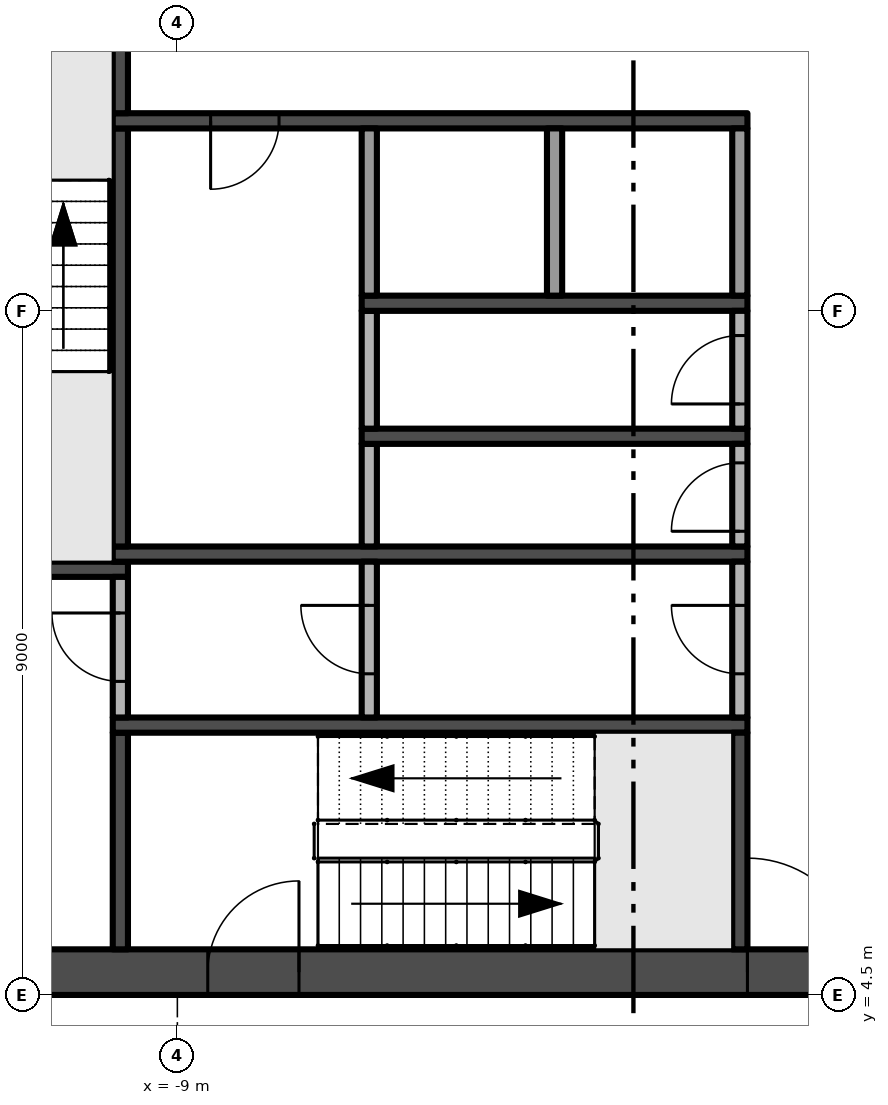
"""IFC4 building model, lengths in metres.
Left out: names, types, materials, properties, quantities, classifications, styles, units other than length and angle.
Written with IfcOpenShell. Run it as: python <this file> out.ifc"""

import sys

from ifc_helpers import new_model, si_unit, direction, frame, frame_2d, origin, place, context, subcontext, project, spatial, rectangle, extrude, element, fill, save


model = new_model("IFC4")
c1 = context("Model", 3, precision=1e-05, world=origin(), true_north=direction((0.0, 1.0)))
c2 = subcontext(c1, "Body", "Model", "MODEL_VIEW")
j1 = project(units=[si_unit("LENGTHUNIT", "METRE"), si_unit("PLANEANGLEUNIT", "RADIAN")], contexts=[c1])
p1 = place(None, origin())
s1 = spatial("IfcSite", under=j1, at=p1, CompositionType="ELEMENT")
p2 = place(p1, origin())
s2 = spatial("IfcBuilding", under=s1, at=p2, CompositionType="ELEMENT")
p3 = place(p2, frame((0.0, 0.0, 284.4)))
s3 = spatial("IfcBuildingStorey", under=s2, at=p3, CompositionType="ELEMENT", Elevation=284.4)
p4 = place(p3, frame((-13.5, 4.8, -0.3), z_axis=(0.0, 0.0, 1.0), x_axis=(1.0, 0.0, 0.0)))
e1 = element("IfcWall", 1, at=p4, inside=s3, PredefinedType="SHEAR", context=c2, shape_type="SweptSolid", body=[
    extrude(rectangle(XDim=27.0, YDim=0.6, at=frame_2d((13.5, 0.0))), origin(), (0.0, 0.0, 1.0), 5.0),
])
p5 = place(p4, frame((12.0, 0.0, 0.3)))
e2 = element("IfcOpeningElement", 2, at=p5, cuts=e1, PredefinedType="OPENING", context=c2, shape_type="SweptSolid", body=[
    extrude(rectangle(XDim=3.0, YDim=2.4, at=frame_2d((1.5, 1.2))), frame((0.0, 0.31, 0.0), z_axis=(0.0, -1.0, 0.0), x_axis=(1.0, 0.0, 0.0)), (0.0, 0.0, 1.0), 0.62),
])
p6 = place(p4, frame((4.9, 0.0, 0.3)))
e3 = element("IfcOpeningElement", 3, at=p6, cuts=e1, PredefinedType="OPENING", context=c2, shape_type="SweptSolid", body=[
    extrude(rectangle(XDim=1.2, YDim=2.2, at=frame_2d((0.6, 1.1))), frame((0.0, 0.31, 0.0), z_axis=(0.0, -1.0, 0.0), x_axis=(1.0, 0.0, 0.0)), (0.0, 0.0, 1.0), 0.62),
])
p7 = place(p4, frame((20.75, 0.0, 0.3)))
e4 = element("IfcOpeningElement", 4, at=p7, cuts=e1, PredefinedType="OPENING", context=c2, shape_type="SweptSolid", body=[
    extrude(rectangle(XDim=1.5, YDim=2.2, at=frame_2d((0.75, 1.1))), frame((0.0, 0.31, 0.0), z_axis=(0.0, -1.0, 0.0), x_axis=(1.0, 0.0, 0.0)), (0.0, 0.0, 1.0), 0.62),
])
p8 = place(p4, frame((17.4, 0.0, 0.3)))
e5 = element("IfcOpeningElement", 5, at=p8, cuts=e1, PredefinedType="OPENING", context=c2, shape_type="SweptSolid", body=[
    extrude(rectangle(XDim=1.2, YDim=2.2, at=frame_2d((0.6, 1.1))), frame((0.0, 0.31, 0.0), z_axis=(0.0, -1.0, 0.0), x_axis=(1.0, 0.0, 0.0)), (0.0, 0.0, 1.0), 0.62),
])
p9 = place(p3, frame((-12.9, 10.1, 0.0), z_axis=(0.0, 0.0, 1.0), x_axis=(1.0, 0.0, 0.0)))
e6 = element("IfcWall", 6, at=p9, inside=s3, PredefinedType="SHEAR", context=c2, shape_type="SweptSolid", body=[
    extrude(rectangle(XDim=3.25, YDim=0.2, at=frame_2d((1.625, 0.0))), origin(), (0.0, 0.0, 1.0), 4.7),
])
p10 = place(p3, frame((-9.75, 5.1, 0.0), z_axis=(0.0, 0.0, 1.0), x_axis=(0.0, 1.0, 0.0)))
e7 = element("IfcWall", 7, at=p10, inside=s3, PredefinedType="SHEAR", context=c2, shape_type="SweptSolid", body=[
    extrude(rectangle(XDim=2.85, YDim=0.2, at=frame_2d((1.425, 0.0))), origin(), (0.0, 0.0, 1.0), 4.7),
])
p11 = place(p3, frame((-9.85, 8.05, 0.0), z_axis=(0.0, 0.0, 1.0), x_axis=(1.0, 0.0, 0.0)))
e8 = element("IfcWall", 8, at=p11, inside=s3, PredefinedType="SHEAR", context=c2, shape_type="SweptSolid", body=[
    extrude(rectangle(XDim=8.35, YDim=0.2, at=frame_2d((4.175, 0.0))), origin(), (0.0, 0.0, 1.0), 4.7),
])
p12 = place(p3, frame((-9.75, 8.15, 0.0), z_axis=(0.0, 0.0, 1.0), x_axis=(0.0, 1.0, 0.0)))
e9 = element("IfcWall", 9, at=p12, inside=s3, PredefinedType="PARTITIONING", context=c2, shape_type="SweptSolid", body=[
    extrude(rectangle(XDim=1.85, YDim=0.2, at=frame_2d((0.925, 0.0))), origin(), (0.0, 0.0, 1.0), 4.7),
])
p13 = place(p12, frame((0.475, 0.0, 0.0)))
e10 = element("IfcOpeningElement", 10, at=p13, cuts=e9, PredefinedType="OPENING", context=c2, shape_type="SweptSolid", body=[
    extrude(rectangle(XDim=0.9, YDim=2.1, at=frame_2d((0.45, 1.05))), frame((0.0, 0.11, 0.0), z_axis=(0.0, -1.0, 0.0), x_axis=(1.0, 0.0, 0.0)), (0.0, 0.0, 1.0), 0.22),
])
p14 = place(p3, frame((-9.85, 10.3, 0.0), z_axis=(0.0, 0.0, 1.0), x_axis=(1.0, 0.0, 0.0)))
e11 = element("IfcWall", 11, at=p14, inside=s3, PredefinedType="SHEAR", context=c2, shape_type="SweptSolid", body=[
    extrude(rectangle(XDim=8.35, YDim=0.2, at=frame_2d((4.175, 0.0))), origin(), (0.0, 0.0, 1.0), 4.7),
])
p15 = place(p3, frame((-9.75, 10.4, 0.0), z_axis=(0.0, 0.0, 1.0), x_axis=(0.0, 1.0, 0.0)))
e12 = element("IfcWall", 12, at=p15, inside=s3, PredefinedType="SHEAR", context=c2, shape_type="SweptSolid", body=[
    extrude(rectangle(XDim=5.5, YDim=0.2, at=frame_2d((2.75, 0.0))), origin(), (0.0, 0.0, 1.0), 4.7),
])
p16 = place(p3, frame((-1.5, 16.0, 0.0), z_axis=(0.0, 0.0, 1.0), x_axis=(-1.0, 0.0, 0.0)))
e13 = element("IfcWall", 13, at=p16, inside=s3, PredefinedType="SHEAR", context=c2, shape_type="SweptSolid", body=[
    extrude(rectangle(XDim=8.35, YDim=0.2, at=frame_2d((4.175, 0.0))), origin(), (0.0, 0.0, 1.0), 4.7),
])
p17 = place(p16, frame((6.162, 0.0, 0.0)))
e14 = element("IfcOpeningElement", 14, at=p17, cuts=e13, PredefinedType="OPENING", context=c2, shape_type="SweptSolid", body=[
    extrude(rectangle(XDim=0.9, YDim=2.1, at=frame_2d((0.45, 1.05))), frame((0.0, 0.11, 0.0), z_axis=(0.0, -1.0, 0.0), x_axis=(1.0, 0.0, 0.0)), (0.0, 0.0, 1.0), 0.22),
])
p18 = place(p3, frame((-9.75, 16.1, 0.0), z_axis=(0.0, 0.0, 1.0), x_axis=(0.0, 1.0, 0.0)))
e15 = element("IfcWall", 15, at=p18, inside=s3, PredefinedType="SHEAR", context=c2, shape_type="SweptSolid", body=[
    extrude(rectangle(XDim=1.5, YDim=0.2, at=frame_2d((0.75, 0.0))), origin(), (0.0, 0.0, 1.0), 4.7),
])
p19 = place(p3, frame((-6.475, 8.15, 0.0), z_axis=(0.0, 0.0, 1.0), x_axis=(0.0, 1.0, 0.0)))
e16 = element("IfcWall", 16, at=p19, inside=s3, PredefinedType="PARTITIONING", context=c2, shape_type="SweptSolid", body=[
    extrude(rectangle(XDim=2.05, YDim=0.2, at=frame_2d((1.025, 0.0))), origin(), (0.0, 0.0, 1.0), 4.7),
])
p20 = place(p19, frame((0.575, 0.0, 0.0)))
e17 = element("IfcOpeningElement", 17, at=p20, cuts=e16, PredefinedType="OPENING", context=c2, shape_type="SweptSolid", body=[
    extrude(rectangle(XDim=0.9, YDim=2.1, at=frame_2d((0.45, 1.05))), frame((0.0, 0.11, 0.0), z_axis=(0.0, -1.0, 0.0), x_axis=(1.0, 0.0, 0.0)), (0.0, 0.0, 1.0), 0.22),
])
p21 = place(p3, frame((-6.475, 10.4, 0.0), z_axis=(0.0, 0.0, 1.0), x_axis=(0.0, 1.0, 0.0)))
e18 = element("IfcWall", 18, at=p21, inside=s3, PredefinedType="PARTITIONING", context=c2, shape_type="SweptSolid", body=[
    extrude(rectangle(XDim=1.35, YDim=0.2, at=frame_2d((0.675, 0.0))), origin(), (0.0, 0.0, 1.0), 4.7),
])
p22 = place(p3, frame((-6.575, 11.85, 0.0), z_axis=(0.0, 0.0, 1.0), x_axis=(1.0, 0.0, 0.0)))
e19 = element("IfcWall", 19, at=p22, inside=s3, PredefinedType="SHEAR", context=c2, shape_type="SweptSolid", body=[
    extrude(rectangle(XDim=5.075, YDim=0.2, at=frame_2d((2.538, 0.0))), origin(), (0.0, 0.0, 1.0), 4.7),
])
p23 = place(p3, frame((-6.475, 11.95, 0.0), z_axis=(0.0, 0.0, 1.0), x_axis=(0.0, 1.0, 0.0)))
e20 = element("IfcWall", 20, at=p23, inside=s3, PredefinedType="PARTITIONING", context=c2, shape_type="SweptSolid", body=[
    extrude(rectangle(XDim=1.55, YDim=0.2, at=frame_2d((0.775, 0.0))), origin(), (0.0, 0.0, 1.0), 4.7),
])
p24 = place(p3, frame((-6.575, 13.6, 0.0), z_axis=(0.0, 0.0, 1.0), x_axis=(1.0, 0.0, 0.0)))
e21 = element("IfcWall", 21, at=p24, inside=s3, PredefinedType="SHEAR", context=c2, shape_type="SweptSolid", body=[
    extrude(rectangle(XDim=5.075, YDim=0.2, at=frame_2d((2.538, 0.0))), origin(), (0.0, 0.0, 1.0), 4.7),
])
for number, where, z_axis, x_axis in (
    (22, (-6.475, 13.7, 0.0), (0.0, 0.0, 1.0), (0.0, 1.0, 0.0)),
    (23, (-4.037, 13.7, 0.0), (0.0, 0.0, 1.0), (0.0, 1.0, 0.0)),
):
    element("IfcWall", number, at=place(p3, frame(where, z_axis=z_axis, x_axis=x_axis)), inside=s3, PredefinedType="PARTITIONING", context=c2, shape_type="SweptSolid", body=[
        extrude(rectangle(XDim=2.2, YDim=0.2, at=frame_2d((1.1, 0.0))), origin(), (0.0, 0.0, 1.0), 4.7),
    ])
p25 = place(p3, frame((-1.6, 5.1, 0.0), z_axis=(0.0, 0.0, 1.0), x_axis=(0.0, 1.0, 0.0)))
e24 = element("IfcWall", 24, at=p25, inside=s3, PredefinedType="SHEAR", context=c2, shape_type="SweptSolid", body=[
    extrude(rectangle(XDim=2.85, YDim=0.2, at=frame_2d((1.425, 0.0))), origin(), (0.0, 0.0, 1.0), 4.7),
])
p26 = place(p3, frame((-1.6, 8.15, 0.0), z_axis=(0.0, 0.0, 1.0), x_axis=(0.0, 1.0, 0.0)))
e25 = element("IfcWall", 25, at=p26, inside=s3, PredefinedType="PARTITIONING", context=c2, shape_type="SweptSolid", body=[
    extrude(rectangle(XDim=2.05, YDim=0.2, at=frame_2d((1.025, 0.0))), origin(), (0.0, 0.0, 1.0), 4.7),
])
p27 = place(p26, frame((0.575, 0.0, 0.0)))
e26 = element("IfcOpeningElement", 26, at=p27, cuts=e25, PredefinedType="OPENING", context=c2, shape_type="SweptSolid", body=[
    extrude(rectangle(XDim=0.9, YDim=2.1, at=frame_2d((0.45, 1.05))), frame((0.0, 0.11, 0.0), z_axis=(0.0, -1.0, 0.0), x_axis=(1.0, 0.0, 0.0)), (0.0, 0.0, 1.0), 0.22),
])
p28 = place(p3, frame((-1.6, 10.4, 0.0), z_axis=(0.0, 0.0, 1.0), x_axis=(0.0, 1.0, 0.0)))
e27 = element("IfcWall", 27, at=p28, inside=s3, PredefinedType="PARTITIONING", context=c2, shape_type="SweptSolid", body=[
    extrude(rectangle(XDim=1.35, YDim=0.2, at=frame_2d((0.675, 0.0))), origin(), (0.0, 0.0, 1.0), 4.7),
])
p29 = place(p28, frame((0.2, 0.0, 0.0)))
e28 = element("IfcOpeningElement", 28, at=p29, cuts=e27, PredefinedType="OPENING", context=c2, shape_type="SweptSolid", body=[
    extrude(rectangle(XDim=0.9, YDim=2.1, at=frame_2d((0.45, 1.05))), frame((0.0, 0.11, 0.0), z_axis=(0.0, -1.0, 0.0), x_axis=(1.0, 0.0, 0.0)), (0.0, 0.0, 1.0), 0.22),
])
p30 = place(p3, frame((-1.6, 11.95, 0.0), z_axis=(0.0, 0.0, 1.0), x_axis=(0.0, 1.0, 0.0)))
e29 = element("IfcWall", 29, at=p30, inside=s3, PredefinedType="PARTITIONING", context=c2, shape_type="SweptSolid", body=[
    extrude(rectangle(XDim=1.55, YDim=0.2, at=frame_2d((0.775, 0.0))), origin(), (0.0, 0.0, 1.0), 4.7),
])
p31 = place(p30, frame((0.325, 0.0, 0.0)))
e30 = element("IfcOpeningElement", 30, at=p31, cuts=e29, PredefinedType="OPENING", context=c2, shape_type="SweptSolid", body=[
    extrude(rectangle(XDim=0.9, YDim=2.1, at=frame_2d((0.45, 1.05))), frame((0.0, 0.11, 0.0), z_axis=(0.0, -1.0, 0.0), x_axis=(1.0, 0.0, 0.0)), (0.0, 0.0, 1.0), 0.22),
])
p32 = place(p3, frame((-1.6, 13.7, 0.0), z_axis=(0.0, 0.0, 1.0), x_axis=(0.0, 1.0, 0.0)))
e31 = element("IfcWall", 31, at=p32, inside=s3, PredefinedType="PARTITIONING", context=c2, shape_type="SweptSolid", body=[
    extrude(rectangle(XDim=2.2, YDim=0.2, at=frame_2d((1.1, 0.0))), origin(), (0.0, 0.0, 1.0), 4.7),
])
p33 = place(p5, frame((3.0, 0.0, 0.0), z_axis=(0.0, 0.0, 1.0), x_axis=(-1.0, 0.0, 0.0)))
e32 = element("IfcDoor", 32, at=p33, inside=s3, OperationType="DOUBLE_DOOR_SINGLE_SWING", PredefinedType="DOOR", context=c2, shape_type="SweptSolid", body=[
    extrude(rectangle(XDim=3.0, YDim=2.4, at=frame_2d((1.5, 1.2))), frame((0.0, 0.025, 0.0), z_axis=(0.0, -1.0, 0.0), x_axis=(1.0, 0.0, 0.0)), (0.0, 0.0, 1.0), 0.05),
])
fill(e2, e32)
p34 = place(p6, frame((1.2, 0.0, 0.0), z_axis=(0.0, 0.0, 1.0), x_axis=(-1.0, 0.0, 0.0)))
e33 = element("IfcDoor", 33, at=p34, inside=s3, OperationType="SINGLE_SWING_LEFT", PredefinedType="DOOR", context=c2, shape_type="SweptSolid", body=[
    extrude(rectangle(XDim=1.2, YDim=2.2, at=frame_2d((0.6, 1.1))), frame((0.0, 0.025, 0.0), z_axis=(0.0, -1.0, 0.0), x_axis=(1.0, 0.0, 0.0)), (0.0, 0.0, 1.0), 0.05),
])
fill(e3, e33)
p35 = place(p17, origin())
e34 = element("IfcDoor", 34, at=p35, inside=s3, OperationType="SINGLE_SWING_RIGHT", PredefinedType="DOOR", context=c2, shape_type="SweptSolid", body=[
    extrude(rectangle(XDim=0.9, YDim=2.1, at=frame_2d((0.45, 1.05))), frame((0.0, 0.025, 0.0), z_axis=(0.0, -1.0, 0.0), x_axis=(1.0, 0.0, 0.0)), (0.0, 0.0, 1.0), 0.05),
])
fill(e14, e34)
p36 = place(p27, origin())
e35 = element("IfcDoor", 35, at=p36, inside=s3, OperationType="SINGLE_SWING_RIGHT", PredefinedType="DOOR", context=c2, shape_type="SweptSolid", body=[
    extrude(rectangle(XDim=0.9, YDim=2.1, at=frame_2d((0.45, 1.05))), frame((0.0, 0.025, 0.0), z_axis=(0.0, -1.0, 0.0), x_axis=(1.0, 0.0, 0.0)), (0.0, 0.0, 1.0), 0.05),
])
fill(e26, e35)
p37 = place(p29, origin())
e36 = element("IfcDoor", 36, at=p37, inside=s3, OperationType="SINGLE_SWING_LEFT", PredefinedType="DOOR", context=c2, shape_type="SweptSolid", body=[
    extrude(rectangle(XDim=0.9, YDim=2.1, at=frame_2d((0.45, 1.05))), frame((0.0, 0.025, 0.0), z_axis=(0.0, -1.0, 0.0), x_axis=(1.0, 0.0, 0.0)), (0.0, 0.0, 1.0), 0.05),
])
fill(e28, e36)
p38 = place(p31, origin())
e37 = element("IfcDoor", 37, at=p38, inside=s3, OperationType="SINGLE_SWING_LEFT", PredefinedType="DOOR", context=c2, shape_type="SweptSolid", body=[
    extrude(rectangle(XDim=0.9, YDim=2.1, at=frame_2d((0.45, 1.05))), frame((0.0, 0.025, 0.0), z_axis=(0.0, -1.0, 0.0), x_axis=(1.0, 0.0, 0.0)), (0.0, 0.0, 1.0), 0.05),
])
fill(e30, e37)
p39 = place(p20, origin())
e38 = element("IfcDoor", 38, at=p39, inside=s3, OperationType="SINGLE_SWING_RIGHT", PredefinedType="DOOR", context=c2, shape_type="SweptSolid", body=[
    extrude(rectangle(XDim=0.9, YDim=2.1, at=frame_2d((0.45, 1.05))), frame((0.0, 0.025, 0.0), z_axis=(0.0, -1.0, 0.0), x_axis=(1.0, 0.0, 0.0)), (0.0, 0.0, 1.0), 0.05),
])
fill(e17, e38)
p40 = place(p13, origin())
e39 = element("IfcDoor", 39, at=p40, inside=s3, OperationType="SINGLE_SWING_RIGHT", PredefinedType="DOOR", context=c2, shape_type="SweptSolid", body=[
    extrude(rectangle(XDim=0.9, YDim=2.1, at=frame_2d((0.45, 1.05))), frame((0.0, 0.025, 0.0), z_axis=(0.0, -1.0, 0.0), x_axis=(1.0, 0.0, 0.0)), (0.0, 0.0, 1.0), 0.05),
])
fill(e10, e39)
save(model, sys.argv[1])
